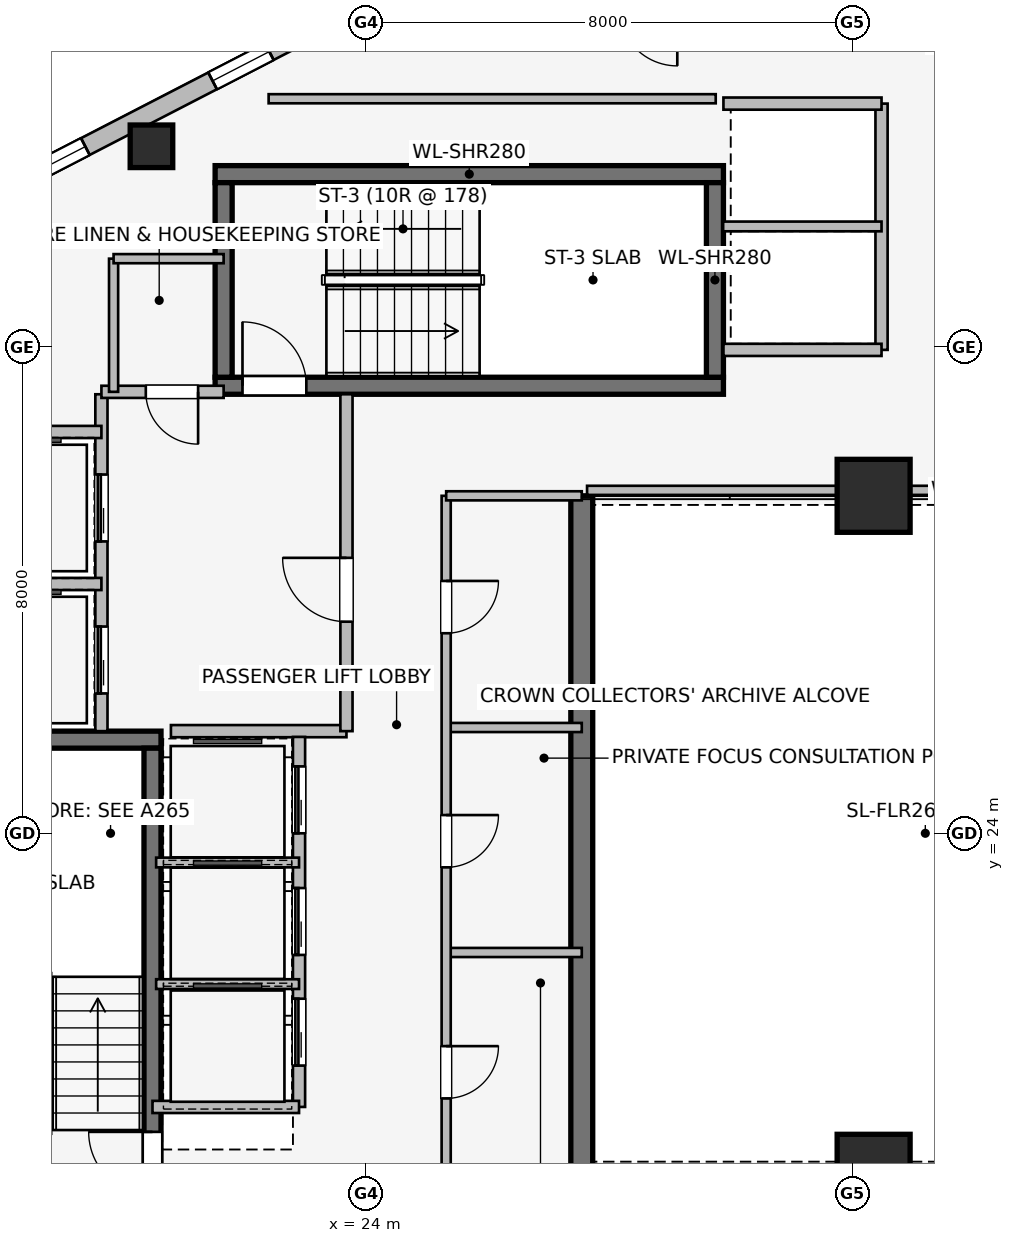
"""IFC4 building model, lengths in metres.
Left out: names, types, materials, properties, quantities, classifications, styles, units other than length and angle.
Written with IfcOpenShell. Run it as: python <this file> out.ifc"""

import sys

from ifc_helpers import new_model, si_unit, direction, frame, frame_2d, origin, origin_2d, place, context, subcontext, project, spatial, rectangle, extrude, element, fill, save


model = new_model("IFC4")
c1 = context("Model", 3, precision=1e-05, world=origin(), true_north=direction((0.0, 1.0)))
c2 = subcontext(c1, "Body", "Model", "MODEL_VIEW")
j1 = project(units=[si_unit("LENGTHUNIT", "METRE"), si_unit("PLANEANGLEUNIT", "RADIAN")], contexts=[c1])
p1 = place(None, origin())
s1 = spatial("IfcSite", under=j1, at=p1, CompositionType="ELEMENT")
p2 = place(p1, origin())
s2 = spatial("IfcBuilding", under=s1, at=p2, CompositionType="ELEMENT")
p3 = place(p2, frame((0.0, 0.0, 231.25)))
s3 = spatial("IfcBuildingStorey", under=s2, at=p3, CompositionType="ELEMENT", Elevation=231.25)
p4 = place(p3, frame((27.55, 29.55, 0.0), z_axis=(0.0, 0.0, 1.0), x_axis=(0.0, -1.0, 0.0)))
e1 = element("IfcWall", 1, at=p4, inside=s3, PredefinedType="SHEAR", context=c2, shape_type="SweptSolid", body=[
    extrude(rectangle(XDim=11.25, YDim=0.36, at=frame_2d((5.625, 0.0))), origin(), (0.0, 0.0, 1.0), 3.55),
])
p5 = place(p3, frame((20.63, 25.54, 0.0), z_axis=(0.0, 0.0, 1.0), x_axis=(-1.0, 0.0, 0.0)))
e2 = element("IfcWall", 2, at=p5, inside=s3, PredefinedType="SHEAR", context=c2, shape_type="SweptSolid", body=[
    extrude(rectangle(XDim=3.76, YDim=0.28, at=frame_2d((1.88, 0.0))), origin(), (0.0, 0.0, 1.0), 3.55),
])
p6 = place(p3, frame((20.49, 17.6, 0.0), z_axis=(0.0, 0.0, 1.0), x_axis=(0.0, 1.0, 0.0)))
e3 = element("IfcWall", 3, at=p6, inside=s3, PredefinedType="SHEAR", context=c2, shape_type="SweptSolid", body=[
    extrude(rectangle(XDim=7.8, YDim=0.28, at=frame_2d((3.9, 0.0))), origin(), (0.0, 0.0, 1.0), 3.55),
])
p7 = place(p6, frame((0.44, 0.0, 0.0)))
e4 = element("IfcOpeningElement", 4, at=p7, cuts=e3, PredefinedType="OPENING", context=c2, shape_type="SweptSolid", body=[
    extrude(rectangle(XDim=1.05, YDim=2.0, at=frame_2d((0.525, 1.0))), frame((0.0, 0.15, 0.0), z_axis=(0.0, -1.0, 0.0), x_axis=(1.0, 0.0, 0.0)), (0.0, 0.0, 1.0), 0.3),
])
p8 = place(p3, frame((21.52, 31.36, 0.0), z_axis=(0.0, 0.0, 1.0), x_axis=(1.0, 0.0, 0.0)))
e5 = element("IfcWall", 5, at=p8, inside=s3, PredefinedType="SHEAR", context=c2, shape_type="SweptSolid", body=[
    extrude(rectangle(XDim=8.36, YDim=0.28, at=frame_2d((4.18, 0.0))), origin(), (0.0, 0.0, 1.0), 3.55),
])
p9 = place(p8, frame((0.45, 0.0, 0.0)))
e6 = element("IfcOpeningElement", 6, at=p9, cuts=e5, PredefinedType="OPENING", context=c2, shape_type="SweptSolid", body=[
    extrude(rectangle(XDim=1.05, YDim=2.0, at=frame_2d((0.525, 1.0))), frame((0.0, 0.15, 0.0), z_axis=(0.0, -1.0, 0.0), x_axis=(1.0, 0.0, 0.0)), (0.0, 0.0, 1.0), 0.3),
])
p10 = place(p3, frame((29.88, 34.84, 0.0), z_axis=(0.0, 0.0, 1.0), x_axis=(-1.0, 0.0, 0.0)))
e7 = element("IfcWall", 7, at=p10, inside=s3, PredefinedType="SHEAR", context=c2, shape_type="SweptSolid", body=[
    extrude(rectangle(XDim=8.36, YDim=0.28, at=frame_2d((4.18, 0.0))), origin(), (0.0, 0.0, 1.0), 3.55),
])
for number, where, z_axis, x_axis in (
    (8, (21.66, 34.7, 0.0), (0.0, 0.0, 1.0), (0.0, -1.0, 0.0)),
    (9, (29.74, 31.5, 0.0), (0.0, 0.0, 1.0), (0.0, 1.0, 0.0)),
):
    element("IfcWall", number, at=place(p3, frame(where, z_axis=z_axis, x_axis=x_axis)), inside=s3, PredefinedType="SHEAR", context=c2, shape_type="SweptSolid", body=[
        extrude(rectangle(XDim=3.2, YDim=0.28, at=frame_2d((1.6, 0.0))), origin(), (0.0, 0.0, 1.0), 3.55),
    ])
for number, where, z_axis, x_axis in (
    (10, (32.35, 18.45, 0.0), (0.0, 0.0, 1.0), (1.0, 0.0, 0.0)),
    (11, (32.35, 29.55, 0.0), (0.0, 0.0, 1.0), (1.0, 0.0, 0.0)),
):
    element("IfcColumn", number, at=place(p3, frame(where, z_axis=z_axis, x_axis=x_axis)), inside=s3, PredefinedType="COLUMN", context=c2, shape_type="SweptSolid", body=[
        extrude(rectangle(XDim=1.2, YDim=1.2, at=origin_2d()), origin(), (0.0, 0.0, 1.0), 3.55),
    ])
p11 = place(p3, frame((20.473, 35.298, 0.0), z_axis=(0.0, 0.0, 1.0), x_axis=(1.0, 0.0, 0.0)))
e12 = element("IfcColumn", 12, at=p11, inside=s3, PredefinedType="COLUMN", context=c2, shape_type="SweptSolid", body=[
    extrude(rectangle(XDim=0.7, YDim=0.7, at=origin_2d()), origin(), (0.0, 0.0, 1.0), 3.55),
])
p12 = place(p3, frame((17.566, 34.354, 0.0), z_axis=(0.0, 0.0, 1.0), x_axis=(0.888581481622, 0.458718814218, 0.0)))
e13 = element("IfcWall", 13, at=p12, inside=s3, PredefinedType="STANDARD", context=c2, shape_type="SweptSolid", body=[
    extrude(rectangle(XDim=15.077, YDim=0.31, at=frame_2d((7.539, 0.0))), origin(), (0.0, 0.0, 1.0), 3.26),
])
p13 = place(p12, frame((0.998, 0.0, 0.75)))
e14 = element("IfcOpeningElement", 14, at=p13, cuts=e13, PredefinedType="OPENING", context=c2, shape_type="SweptSolid", body=[
    extrude(rectangle(XDim=1.05, YDim=1.4, at=frame_2d((0.525, 0.7))), frame((0.0, 0.165, 0.0), z_axis=(0.0, -1.0, 0.0), x_axis=(1.0, 0.0, 0.0)), (0.0, 0.0, 1.0), 0.33),
])
p14 = place(p12, frame((4.403, 0.0, 0.75)))
e15 = element("IfcOpeningElement", 15, at=p14, cuts=e13, PredefinedType="OPENING", context=c2, shape_type="SweptSolid", body=[
    extrude(rectangle(XDim=1.05, YDim=1.4, at=frame_2d((0.525, 0.7))), frame((0.0, 0.165, 0.0), z_axis=(0.0, -1.0, 0.0), x_axis=(1.0, 0.0, 0.0)), (0.0, 0.0, 1.0), 0.33),
])
p15 = place(p12, frame((8.086, 0.0, 0.75)))
e16 = element("IfcOpeningElement", 16, at=p15, cuts=e13, PredefinedType="OPENING", context=c2, shape_type="SweptSolid", body=[
    extrude(rectangle(XDim=2.4, YDim=1.6, at=frame_2d((1.2, 0.8))), frame((0.0, 0.165, 0.0), z_axis=(0.0, -1.0, 0.0), x_axis=(1.0, 0.0, 0.0)), (0.0, 0.0, 1.0), 0.33),
])
p16 = place(p12, frame((13.029, 0.0, 0.75)))
e17 = element("IfcOpeningElement", 17, at=p16, cuts=e13, PredefinedType="OPENING", context=c2, shape_type="SweptSolid", body=[
    extrude(rectangle(XDim=1.05, YDim=1.4, at=frame_2d((0.525, 0.7))), frame((0.0, 0.165, 0.0), z_axis=(0.0, -1.0, 0.0), x_axis=(1.0, 0.0, 0.0)), (0.0, 0.0, 1.0), 0.33),
])
p17 = place(p3, frame((19.65, 25.68, 0.0), z_axis=(0.0, 0.0, 1.0), x_axis=(0.0, 1.0, 0.0)))
e18 = element("IfcWall", 18, at=p17, inside=s3, PredefinedType="PARTITIONING", context=c2, shape_type="SweptSolid", body=[
    extrude(rectangle(XDim=5.54, YDim=0.2, at=frame_2d((2.77, 0.0))), origin(), (0.0, 0.0, 1.0), 3.26),
])
p18 = place(p17, frame((0.62, 0.0, 0.0)))
e19 = element("IfcOpeningElement", 19, at=p18, cuts=e18, PredefinedType="OPENING", context=c2, shape_type="SweptSolid", body=[
    extrude(rectangle(XDim=1.1, YDim=2.2, at=frame_2d((0.55, 1.1))), frame((0.0, 0.11, 0.0), z_axis=(0.0, -1.0, 0.0), x_axis=(1.0, 0.0, 0.0)), (0.0, 0.0, 1.0), 0.22),
])
p19 = place(p17, frame((3.12, 0.0, 0.0)))
e20 = element("IfcOpeningElement", 20, at=p19, cuts=e18, PredefinedType="OPENING", context=c2, shape_type="SweptSolid", body=[
    extrude(rectangle(XDim=1.1, YDim=2.2, at=frame_2d((0.55, 1.1))), frame((0.0, 0.11, 0.0), z_axis=(0.0, -1.0, 0.0), x_axis=(1.0, 0.0, 0.0)), (0.0, 0.0, 1.0), 0.22),
])
p20 = place(p3, frame((20.793, 25.68, 0.0), z_axis=(0.0, 0.0, 1.0), x_axis=(1.0, 0.0, 0.0)))
e21 = element("IfcWall", 21, at=p20, inside=s3, PredefinedType="PARTITIONING", context=c2, shape_type="SweptSolid", body=[
    extrude(rectangle(XDim=2.887, YDim=0.2, at=frame_2d((1.443, 0.0))), origin(), (0.0, 0.0, 1.0), 3.26),
])
p21 = place(p3, frame((23.68, 25.68, 0.0), z_axis=(0.0, 0.0, 1.0), x_axis=(0.0, 1.0, 0.0)))
e22 = element("IfcWall", 22, at=p21, inside=s3, PredefinedType="PARTITIONING", context=c2, shape_type="SweptSolid", body=[
    extrude(rectangle(XDim=5.54, YDim=0.2, at=frame_2d((2.77, 0.0))), origin(), (0.0, 0.0, 1.0), 3.26),
])
p22 = place(p21, frame((1.8, 0.0, 0.0)))
e23 = element("IfcOpeningElement", 23, at=p22, cuts=e22, PredefinedType="OPENING", context=c2, shape_type="SweptSolid", body=[
    extrude(rectangle(XDim=1.05, YDim=2.0, at=frame_2d((0.525, 1.0))), frame((0.0, 0.11, 0.0), z_axis=(0.0, -1.0, 0.0), x_axis=(1.0, 0.0, 0.0)), (0.0, 0.0, 1.0), 0.22),
])
p23 = place(p3, frame((21.66, 31.26, 0.0), z_axis=(0.0, 0.0, 1.0), x_axis=(-1.0, 0.0, 0.0)))
e24 = element("IfcWall", 24, at=p23, inside=s3, PredefinedType="PARTITIONING", context=c2, shape_type="SweptSolid", body=[
    extrude(rectangle(XDim=2.01, YDim=0.2, at=frame_2d((1.005, 0.0))), origin(), (0.0, 0.0, 1.0), 3.26),
])
p24 = place(p23, frame((0.42, 0.0, 0.0)))
e25 = element("IfcOpeningElement", 25, at=p24, cuts=e24, PredefinedType="OPENING", context=c2, shape_type="SweptSolid", body=[
    extrude(rectangle(XDim=0.86, YDim=2.0, at=frame_2d((0.43, 1.0))), frame((0.0, 0.11, 0.0), z_axis=(0.0, -1.0, 0.0), x_axis=(1.0, 0.0, 0.0)), (0.0, 0.0, 1.0), 0.22),
])
p25 = place(p3, frame((17.15, 28.1, 0.0), z_axis=(0.0, 0.0, 1.0), x_axis=(1.0, 0.0, 0.0)))
e26 = element("IfcWall", 26, at=p25, inside=s3, PredefinedType="PARTITIONING", context=c2, shape_type="SweptSolid", body=[
    extrude(rectangle(XDim=2.5, YDim=0.2, at=frame_2d((1.25, 0.0))), origin(), (0.0, 0.0, 1.0), 3.26),
])
p26 = place(p3, frame((19.65, 30.6, 0.0), z_axis=(0.0, 0.0, 1.0), x_axis=(-1.0, 0.0, 0.0)))
e27 = element("IfcWall", 27, at=p26, inside=s3, PredefinedType="PARTITIONING", context=c2, shape_type="SweptSolid", body=[
    extrude(rectangle(XDim=2.5, YDim=0.2, at=frame_2d((1.25, 0.0))), origin(), (0.0, 0.0, 1.0), 2.16),
])
p27 = place(p3, frame((32.48, 31.95, 0.0), z_axis=(0.0, 0.0, 1.0), x_axis=(0.0, 1.0, 0.0)))
e28 = element("IfcWall", 28, at=p27, inside=s3, PredefinedType="PARTITIONING", context=c2, shape_type="SweptSolid", body=[
    extrude(rectangle(XDim=4.05, YDim=0.2, at=frame_2d((2.025, 0.0))), origin(), (0.0, 0.0, 1.0), 3.26),
])
for number, where, z_axis, x_axis in (
    (29, (29.88, 36.0, 0.0), (0.0, 0.0, 1.0), (1.0, 0.0, 0.0)),
    (30, (32.48, 31.95, 0.0), (0.0, 0.0, 1.0), (-1.0, 0.0, 0.0)),
):
    element("IfcWall", number, at=place(p3, frame(where, z_axis=z_axis, x_axis=x_axis)), inside=s3, PredefinedType="PARTITIONING", context=c2, shape_type="SweptSolid", body=[
        extrude(rectangle(XDim=2.6, YDim=0.2, at=frame_2d((1.3, 0.0))), origin(), (0.0, 0.0, 1.0), 3.26),
    ])
p28 = place(p3, frame((29.875, 33.98, 0.0), z_axis=(0.0, 0.0, 1.0), x_axis=(1.0, 0.0, 0.0)))
e31 = element("IfcWall", 31, at=p28, inside=s3, PredefinedType="PARTITIONING", context=c2, shape_type="SweptSolid", body=[
    extrude(rectangle(XDim=2.605, YDim=0.16, at=frame_2d((1.302, 0.0))), origin(), (0.0, 0.0, 1.0), 3.26),
])
p29 = place(p3, frame((22.9, 19.5, 0.0), z_axis=(0.0, 0.0, 1.0), x_axis=(0.0, 1.0, 0.0)))
e32 = element("IfcWall", 32, at=p29, inside=s3, PredefinedType="PARTITIONING", context=c2, shape_type="SweptSolid", body=[
    extrude(rectangle(XDim=6.085, YDim=0.2, at=frame_2d((3.042, 0.0))), origin(), (0.0, 0.0, 1.0), 3.26),
])
p30 = place(p29, frame((0.68, 0.0, 0.0)))
e33 = element("IfcOpeningElement", 33, at=p30, cuts=e32, PredefinedType="OPENING", context=c2, shape_type="SweptSolid", body=[
    extrude(rectangle(XDim=1.1, YDim=2.2, at=frame_2d((0.55, 1.1))), frame((0.0, 0.11, 0.0), z_axis=(0.0, -1.0, 0.0), x_axis=(1.0, 0.0, 0.0)), (0.0, 0.0, 1.0), 0.22),
])
p31 = place(p29, frame((2.5, 0.0, 0.0)))
e34 = element("IfcOpeningElement", 34, at=p31, cuts=e32, PredefinedType="OPENING", context=c2, shape_type="SweptSolid", body=[
    extrude(rectangle(XDim=1.1, YDim=2.2, at=frame_2d((0.55, 1.1))), frame((0.0, 0.11, 0.0), z_axis=(0.0, -1.0, 0.0), x_axis=(1.0, 0.0, 0.0)), (0.0, 0.0, 1.0), 0.22),
])
p32 = place(p29, frame((4.5, 0.0, 0.0)))
e35 = element("IfcOpeningElement", 35, at=p32, cuts=e32, PredefinedType="OPENING", context=c2, shape_type="SweptSolid", body=[
    extrude(rectangle(XDim=1.1, YDim=2.2, at=frame_2d((0.55, 1.1))), frame((0.0, 0.11, 0.0), z_axis=(0.0, -1.0, 0.0), x_axis=(1.0, 0.0, 0.0)), (0.0, 0.0, 1.0), 0.22),
])
p33 = place(p3, frame((20.49, 19.5, 0.0), z_axis=(0.0, 0.0, 1.0), x_axis=(1.0, 0.0, 0.0)))
e36 = element("IfcWall", 36, at=p33, inside=s3, PredefinedType="PARTITIONING", context=c2, shape_type="SweptSolid", body=[
    extrude(rectangle(XDim=2.41, YDim=0.2, at=frame_2d((1.205, 0.0))), origin(), (0.0, 0.0, 1.0), 2.16),
])
for number, where, z_axis, x_axis in (
    (37, (20.55, 21.52, 0.0), (0.0, 0.0, 1.0), (1.0, 0.0, 0.0)),
    (38, (20.55, 23.52, 0.0), (0.0, 0.0, 1.0), (1.0, 0.0, 0.0)),
):
    element("IfcWall", number, at=place(p3, frame(where, z_axis=z_axis, x_axis=x_axis)), inside=s3, PredefinedType="PARTITIONING", context=c2, shape_type="SweptSolid", body=[
        extrude(rectangle(XDim=2.35, YDim=0.16, at=frame_2d((1.175, 0.0))), origin(), (0.0, 0.0, 1.0), 3.26),
    ])
for number, where, z_axis, x_axis in (
    (39, (25.32, 22.04, 0.0), (0.0, 0.0, 1.0), (1.0, 0.0, 0.0)),
    (40, (25.32, 25.74, 0.0), (0.0, 0.0, 1.0), (1.0, 0.0, 0.0)),
):
    element("IfcWall", number, at=place(p3, frame(where, z_axis=z_axis, x_axis=x_axis)), inside=s3, PredefinedType="PARTITIONING", context=c2, shape_type="SweptSolid", body=[
        extrude(rectangle(XDim=2.23, YDim=0.15, at=frame_2d((1.115, 0.0))), origin(), (0.0, 0.0, 1.0), 3.26),
    ])
p34 = place(p3, frame((25.32, 29.55, 0.0), z_axis=(0.0, 0.0, 1.0), x_axis=(0.0, -1.0, 0.0)))
e41 = element("IfcWall", 41, at=p34, inside=s3, PredefinedType="PARTITIONING", context=c2, shape_type="SweptSolid", body=[
    extrude(rectangle(XDim=11.19, YDim=0.15, at=frame_2d((5.595, 0.0))), origin(), (0.0, 0.0, 1.0), 3.26),
])
p35 = place(p34, frame((1.4, 0.0, 0.0)))
e42 = element("IfcOpeningElement", 42, at=p35, cuts=e41, PredefinedType="OPENING", context=c2, shape_type="SweptSolid", body=[
    extrude(rectangle(XDim=0.86, YDim=2.0, at=frame_2d((0.43, 1.0))), frame((0.0, 0.085, 0.0), z_axis=(0.0, -1.0, 0.0), x_axis=(1.0, 0.0, 0.0)), (0.0, 0.0, 1.0), 0.17),
])
p36 = place(p34, frame((5.25, 0.0, 0.0)))
e43 = element("IfcOpeningElement", 43, at=p36, cuts=e41, PredefinedType="OPENING", context=c2, shape_type="SweptSolid", body=[
    extrude(rectangle(XDim=0.86, YDim=2.0, at=frame_2d((0.43, 1.0))), frame((0.0, 0.085, 0.0), z_axis=(0.0, -1.0, 0.0), x_axis=(1.0, 0.0, 0.0)), (0.0, 0.0, 1.0), 0.17),
])
p37 = place(p34, frame((9.05, 0.0, 0.0)))
e44 = element("IfcOpeningElement", 44, at=p37, cuts=e41, PredefinedType="OPENING", context=c2, shape_type="SweptSolid", body=[
    extrude(rectangle(XDim=0.86, YDim=2.0, at=frame_2d((0.43, 1.0))), frame((0.0, 0.085, 0.0), z_axis=(0.0, -1.0, 0.0), x_axis=(1.0, 0.0, 0.0)), (0.0, 0.0, 1.0), 0.17),
])
p38 = place(p3, frame((27.55, 29.55, 0.0), z_axis=(0.0, 0.0, 1.0), x_axis=(-1.0, 0.0, 0.0)))
e45 = element("IfcWall", 45, at=p38, inside=s3, PredefinedType="PARTITIONING", context=c2, shape_type="SweptSolid", body=[
    extrude(rectangle(XDim=2.23, YDim=0.15, at=frame_2d((1.115, 0.0))), origin(), (0.0, 0.0, 1.0), 2.16),
])
p39 = place(p3, frame((19.85, 33.45, 0.0), z_axis=(0.0, 0.0, 1.0), x_axis=(0.0, -1.0, 0.0)))
e46 = element("IfcWall", 46, at=p39, inside=s3, PredefinedType="PARTITIONING", context=c2, shape_type="SweptSolid", body=[
    extrude(rectangle(XDim=2.19, YDim=0.15, at=frame_2d((1.095, 0.0))), origin(), (0.0, 0.0, 1.0), 3.26),
])
p40 = place(p3, frame((21.66, 33.45, 0.0), z_axis=(0.0, 0.0, 1.0), x_axis=(-1.0, 0.0, 0.0)))
e47 = element("IfcWall", 47, at=p40, inside=s3, PredefinedType="PARTITIONING", context=c2, shape_type="SweptSolid", body=[
    extrude(rectangle(XDim=1.81, YDim=0.15, at=frame_2d((0.905, 0.0))), origin(), (0.0, 0.0, 1.0), 3.26),
])
p41 = place(p3, frame((39.84, 29.64, 0.0), z_axis=(0.0, 0.0, 1.0), x_axis=(-1.0, 0.0, 0.0)))
e48 = element("IfcWall", 48, at=p41, inside=s3, PredefinedType="PARTITIONING", context=c2, shape_type="SweptSolid", body=[
    extrude(rectangle(XDim=12.203, YDim=0.15, at=frame_2d((6.102, 0.0))), origin(), (0.0, 0.0, 1.0), 2.401),
])
p42 = place(p3, frame((29.753, 36.08, 0.0), z_axis=(0.0, 0.0, 1.0), x_axis=(-1.0, 0.0, 0.0)))
e49 = element("IfcWall", 49, at=p42, inside=s3, PredefinedType="PARTITIONING", context=c2, shape_type="SweptSolid", body=[
    extrude(rectangle(XDim=7.353, YDim=0.15, at=frame_2d((3.677, 0.0))), origin(), (0.0, 0.0, 1.0), 2.652),
])
p43 = place(p13, origin())
e50 = element("IfcWindow", 50, at=p43, inside=s3, PartitioningType="SINGLE_PANEL", PredefinedType="WINDOW", context=c2, shape_type="SweptSolid", body=[
    extrude(rectangle(XDim=1.05, YDim=1.4, at=frame_2d((0.525, 0.7))), frame((0.0, 0.03, 0.0), z_axis=(0.0, -1.0, 0.0), x_axis=(1.0, 0.0, 0.0)), (0.0, 0.0, 1.0), 0.06),
])
fill(e14, e50)
p44 = place(p14, origin())
e51 = element("IfcWindow", 51, at=p44, inside=s3, PartitioningType="SINGLE_PANEL", PredefinedType="WINDOW", context=c2, shape_type="SweptSolid", body=[
    extrude(rectangle(XDim=1.05, YDim=1.4, at=frame_2d((0.525, 0.7))), frame((0.0, 0.03, 0.0), z_axis=(0.0, -1.0, 0.0), x_axis=(1.0, 0.0, 0.0)), (0.0, 0.0, 1.0), 0.06),
])
fill(e15, e51)
p45 = place(p7, origin())
e52 = element("IfcDoor", 52, at=p45, inside=s3, OperationType="SINGLE_SWING_RIGHT", PredefinedType="DOOR", context=c2, shape_type="SweptSolid", body=[
    extrude(rectangle(XDim=1.05, YDim=2.0, at=frame_2d((0.525, 1.0))), frame((0.0, 0.025, 0.0), z_axis=(0.0, -1.0, 0.0), x_axis=(1.0, 0.0, 0.0)), (0.0, 0.0, 1.0), 0.05),
])
fill(e4, e52)
p46 = place(p9, origin())
e53 = element("IfcDoor", 53, at=p46, inside=s3, OperationType="SINGLE_SWING_LEFT", PredefinedType="DOOR", context=c2, shape_type="SweptSolid", body=[
    extrude(rectangle(XDim=1.05, YDim=2.0, at=frame_2d((0.525, 1.0))), frame((0.0, 0.025, 0.0), z_axis=(0.0, -1.0, 0.0), x_axis=(1.0, 0.0, 0.0)), (0.0, 0.0, 1.0), 0.05),
])
fill(e6, e53)
p47 = place(p18, origin())
e54 = element("IfcDoor", 54, at=p47, inside=s3, OperationType="SLIDING_TO_LEFT", PredefinedType="DOOR", context=c2, shape_type="SweptSolid", body=[
    extrude(rectangle(XDim=1.1, YDim=2.2, at=frame_2d((0.55, 1.1))), frame((0.0, 0.025, 0.0), z_axis=(0.0, -1.0, 0.0), x_axis=(1.0, 0.0, 0.0)), (0.0, 0.0, 1.0), 0.05),
])
fill(e19, e54)
p48 = place(p19, origin())
e55 = element("IfcDoor", 55, at=p48, inside=s3, OperationType="SLIDING_TO_LEFT", PredefinedType="DOOR", context=c2, shape_type="SweptSolid", body=[
    extrude(rectangle(XDim=1.1, YDim=2.2, at=frame_2d((0.55, 1.1))), frame((0.0, 0.025, 0.0), z_axis=(0.0, -1.0, 0.0), x_axis=(1.0, 0.0, 0.0)), (0.0, 0.0, 1.0), 0.05),
])
fill(e20, e55)
p49 = place(p22, origin())
e56 = element("IfcDoor", 56, at=p49, inside=s3, OperationType="SINGLE_SWING_RIGHT", PredefinedType="DOOR", context=c2, shape_type="SweptSolid", body=[
    extrude(rectangle(XDim=1.05, YDim=2.0, at=frame_2d((0.525, 1.0))), frame((0.0, 0.025, 0.0), z_axis=(0.0, -1.0, 0.0), x_axis=(1.0, 0.0, 0.0)), (0.0, 0.0, 1.0), 0.05),
])
fill(e23, e56)
p50 = place(p24, origin())
e57 = element("IfcDoor", 57, at=p50, inside=s3, OperationType="SINGLE_SWING_LEFT", PredefinedType="DOOR", context=c2, shape_type="SweptSolid", body=[
    extrude(rectangle(XDim=0.86, YDim=2.0, at=frame_2d((0.43, 1.0))), frame((0.0, 0.025, 0.0), z_axis=(0.0, -1.0, 0.0), x_axis=(1.0, 0.0, 0.0)), (0.0, 0.0, 1.0), 0.05),
])
fill(e25, e57)
p51 = place(p30, origin())
e58 = element("IfcDoor", 58, at=p51, inside=s3, OperationType="SLIDING_TO_LEFT", PredefinedType="DOOR", context=c2, shape_type="SweptSolid", body=[
    extrude(rectangle(XDim=1.1, YDim=2.2, at=frame_2d((0.55, 1.1))), frame((0.0, 0.025, 0.0), z_axis=(0.0, -1.0, 0.0), x_axis=(1.0, 0.0, 0.0)), (0.0, 0.0, 1.0), 0.05),
])
fill(e33, e58)
p52 = place(p31, origin())
e59 = element("IfcDoor", 59, at=p52, inside=s3, OperationType="SLIDING_TO_LEFT", PredefinedType="DOOR", context=c2, shape_type="SweptSolid", body=[
    extrude(rectangle(XDim=1.1, YDim=2.2, at=frame_2d((0.55, 1.1))), frame((0.0, 0.025, 0.0), z_axis=(0.0, -1.0, 0.0), x_axis=(1.0, 0.0, 0.0)), (0.0, 0.0, 1.0), 0.05),
])
fill(e34, e59)
p53 = place(p32, origin())
e60 = element("IfcDoor", 60, at=p53, inside=s3, OperationType="SLIDING_TO_LEFT", PredefinedType="DOOR", context=c2, shape_type="SweptSolid", body=[
    extrude(rectangle(XDim=1.1, YDim=2.2, at=frame_2d((0.55, 1.1))), frame((0.0, 0.025, 0.0), z_axis=(0.0, -1.0, 0.0), x_axis=(1.0, 0.0, 0.0)), (0.0, 0.0, 1.0), 0.05),
])
fill(e35, e60)
p54 = place(p35, origin())
e61 = element("IfcDoor", 61, at=p54, inside=s3, OperationType="SINGLE_SWING_LEFT", PredefinedType="DOOR", context=c2, shape_type="SweptSolid", body=[
    extrude(rectangle(XDim=0.86, YDim=2.0, at=frame_2d((0.43, 1.0))), frame((0.0, 0.025, 0.0), z_axis=(0.0, -1.0, 0.0), x_axis=(1.0, 0.0, 0.0)), (0.0, 0.0, 1.0), 0.05),
])
fill(e42, e61)
p55 = place(p36, origin())
e62 = element("IfcDoor", 62, at=p55, inside=s3, OperationType="SINGLE_SWING_LEFT", PredefinedType="DOOR", context=c2, shape_type="SweptSolid", body=[
    extrude(rectangle(XDim=0.86, YDim=2.0, at=frame_2d((0.43, 1.0))), frame((0.0, 0.025, 0.0), z_axis=(0.0, -1.0, 0.0), x_axis=(1.0, 0.0, 0.0)), (0.0, 0.0, 1.0), 0.05),
])
fill(e43, e62)
p56 = place(p37, origin())
e63 = element("IfcDoor", 63, at=p56, inside=s3, OperationType="SINGLE_SWING_LEFT", PredefinedType="DOOR", context=c2, shape_type="SweptSolid", body=[
    extrude(rectangle(XDim=0.86, YDim=2.0, at=frame_2d((0.43, 1.0))), frame((0.0, 0.025, 0.0), z_axis=(0.0, -1.0, 0.0), x_axis=(1.0, 0.0, 0.0)), (0.0, 0.0, 1.0), 0.05),
])
fill(e44, e63)
save(model, sys.argv[1])
